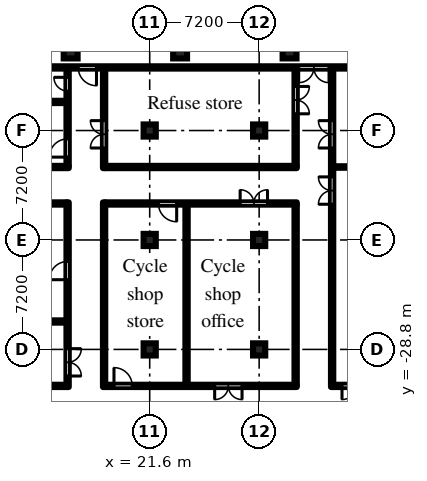
"""IFC4 building model, lengths in metres.
Left out: names, types, materials, properties, quantities, classifications, styles, units other than length and angle.
Written with IfcOpenShell. Run it as: python <this file> out.ifc"""

import sys

from ifc_helpers import new_model, si_unit, direction, frame, frame_2d, origin, origin_2d, place, context, subcontext, project, spatial, rectangle, hollow_circle, extrude, element, fill, save


model = new_model("IFC4")
c1 = context("Model", 3, precision=1e-05, world=origin(), true_north=direction((0.0, 1.0)))
c2 = subcontext(c1, "Body", "Model", "MODEL_VIEW")
j1 = project(units=[si_unit("LENGTHUNIT", "METRE"), si_unit("PLANEANGLEUNIT", "RADIAN")], contexts=[c1])
p1 = place(None, origin())
s1 = spatial("IfcSite", under=j1, at=p1, CompositionType="ELEMENT")
p2 = place(p1, origin())
s2 = spatial("IfcBuilding", under=s1, at=p2, CompositionType="ELEMENT")
p3 = place(p2, origin())
s3 = spatial("IfcBuildingStorey", under=s2, at=p3, CompositionType="ELEMENT", Elevation=0.0)
for number, where, z_axis, x_axis in (
    (1, (21.6, -28.8, 0.0), (0.0, 0.0, 1.0), (1.0, 0.0, 0.0)),
    (2, (21.6, -21.6, 0.0), (0.0, 0.0, 1.0), (1.0, 0.0, 0.0)),
    (3, (21.6, -14.4, 0.0), (0.0, 0.0, 1.0), (1.0, 0.0, 0.0)),
    (4, (28.8, -28.8, 0.0), (0.0, 0.0, 1.0), (1.0, 0.0, 0.0)),
    (5, (28.8, -21.6, 0.0), (0.0, 0.0, 1.0), (1.0, 0.0, 0.0)),
    (6, (28.8, -14.4, 0.0), (0.0, 0.0, 1.0), (1.0, 0.0, 0.0)),
):
    element("IfcColumn", number, at=place(p3, frame(where, z_axis=z_axis, x_axis=x_axis)), inside=s3, PredefinedType="COLUMN", context=c2, shape_type="SweptSolid", body=[
        extrude(rectangle(XDim=0.8, YDim=0.8, at=origin_2d()), origin(), (0.0, 0.0, 1.0), 6.6),
    ])
for number, where, z_axis, x_axis in (
    (7, (16.4, -9.2, 0.0), (0.0, 0.0, 1.0), (1.0, 0.0, 0.0)),
    (8, (23.6, -9.2, 0.0), (0.0, 0.0, 1.0), (1.0, 0.0, 0.0)),
    (9, (30.8, -9.2, 0.0), (0.0, 0.0, 1.0), (1.0, 0.0, 0.0)),
):
    element("IfcColumn", number, at=place(p3, frame(where, z_axis=z_axis, x_axis=x_axis)), inside=s3, PredefinedType="COLUMN", context=c2, shape_type="SweptSolid", body=[
        extrude(hollow_circle(Radius=0.457, WallThickness=0.05, at=origin_2d()), origin(), (0.0, 0.0, 1.0), 7.5),
    ])
p4 = place(p3, frame((9.521, -31.2, 0.0), z_axis=(0.0, 0.0, 1.0), x_axis=(1.0, 0.0, 0.0)))
e10 = element("IfcWall", 10, at=p4, inside=s3, PredefinedType="PARTITIONING", context=c2, shape_type="SweptSolid", body=[
    extrude(rectangle(XDim=6.604, YDim=0.15, at=frame_2d((3.302, 0.0))), origin(), (0.0, 0.0, 1.0), 6.6),
])
p5 = place(p4, frame((0.178, 0.0, 0.0)))
e11 = element("IfcOpeningElement", 11, at=p5, cuts=e10, PredefinedType="OPENING", context=c2, shape_type="SweptSolid", body=[
    extrude(rectangle(XDim=1.8, YDim=2.1, at=frame_2d((0.9, 1.05))), frame((0.0, 0.085, 0.0), z_axis=(0.0, -1.0, 0.0), x_axis=(1.0, 0.0, 0.0)), (0.0, 0.0, 1.0), 0.17),
])
for number, where, z_axis, x_axis in (
    (12, (7.275, -26.964, 0.0), (0.0, 0.0, 1.0), (1.0, 0.0, 0.0)),
    (13, (7.275, -19.2, 0.0), (0.0, 0.0, 1.0), (1.0, 0.0, 0.0)),
):
    element("IfcWall", number, at=place(p3, frame(where, z_axis=z_axis, x_axis=x_axis)), inside=s3, PredefinedType="PARTITIONING", context=c2, shape_type="SweptSolid", body=[
        extrude(rectangle(XDim=8.85, YDim=0.15, at=frame_2d((4.425, 0.0))), origin(), (0.0, 0.0, 1.0), 6.6),
    ])
p6 = place(p3, frame((9.521, -16.8, 0.0), z_axis=(0.0, 0.0, 1.0), x_axis=(1.0, 0.0, 0.0)))
e14 = element("IfcWall", 14, at=p6, inside=s3, PredefinedType="PARTITIONING", context=c2, shape_type="SweptSolid", body=[
    extrude(rectangle(XDim=6.753, YDim=0.15, at=frame_2d((3.377, 0.0))), origin(), (0.0, 0.0, 1.0), 6.6),
])
p7 = place(p3, frame((7.275, -12.518, 0.0), z_axis=(0.0, 0.0, 1.0), x_axis=(1.0, 0.0, 0.0)))
e15 = element("IfcWall", 15, at=p7, inside=s3, PredefinedType="PARTITIONING", context=c2, shape_type="SweptSolid", body=[
    extrude(rectangle(XDim=8.85, YDim=0.15, at=frame_2d((4.425, 0.0))), origin(), (0.0, 0.0, 1.0), 6.6),
])
p8 = place(p3, frame((12.675, -10.25, 0.0), z_axis=(0.0, 0.0, 1.0), x_axis=(1.0, 0.0, 0.0)))
e16 = element("IfcWall", 16, at=p8, inside=s3, PredefinedType="PARTITIONING", context=c2, shape_type="SweptSolid", body=[
    extrude(rectangle(XDim=37.545, YDim=0.15, at=frame_2d((18.772, 0.0))), origin(), (0.0, 0.0, 1.0), 6.6),
])
p9 = place(p8, frame((4.225, 0.0, 0.0)))
e17 = element("IfcOpeningElement", 17, at=p9, cuts=e16, PredefinedType="OPENING", context=c2, shape_type="SweptSolid", body=[
    extrude(rectangle(XDim=1.2, YDim=2.1, at=frame_2d((0.6, 1.05))), frame((0.0, 0.085, 0.0), z_axis=(0.0, -1.0, 0.0), x_axis=(1.0, 0.0, 0.0)), (0.0, 0.0, 1.0), 0.17),
])
p10 = place(p8, frame((18.725, 0.0, 0.0)))
e18 = element("IfcOpeningElement", 18, at=p10, cuts=e16, PredefinedType="OPENING", context=c2, shape_type="SweptSolid", body=[
    extrude(rectangle(XDim=2.0, YDim=2.1, at=frame_2d((1.0, 1.05))), frame((0.0, 0.085, 0.0), z_axis=(0.0, -1.0, 0.0), x_axis=(1.0, 0.0, 0.0)), (0.0, 0.0, 1.0), 0.17),
])
p11 = place(p3, frame((16.2, -31.275, 0.0), z_axis=(0.0, 0.0, 1.0), x_axis=(0.0, 1.0, 0.0)))
e19 = element("IfcWall", 19, at=p11, inside=s3, PredefinedType="PARTITIONING", context=c2, shape_type="SweptSolid", body=[
    extrude(rectangle(XDim=12.15, YDim=0.15, at=frame_2d((6.075, 0.0))), origin(), (0.0, 0.0, 1.0), 6.6),
])
p12 = place(p11, frame((0.725, 0.0, 0.0)))
e20 = element("IfcOpeningElement", 20, at=p12, cuts=e19, PredefinedType="OPENING", context=c2, shape_type="SweptSolid", body=[
    extrude(rectangle(XDim=1.8, YDim=2.1, at=frame_2d((0.9, 1.05))), frame((0.0, 0.085, 0.0), z_axis=(0.0, -1.0, 0.0), x_axis=(1.0, 0.0, 0.0)), (0.0, 0.0, 1.0), 0.17),
])
p13 = place(p11, frame((7.061, 0.0, 0.0)))
e21 = element("IfcOpeningElement", 21, at=p13, cuts=e19, PredefinedType="OPENING", context=c2, shape_type="SweptSolid", body=[
    extrude(rectangle(XDim=1.2, YDim=2.1, at=frame_2d((0.6, 1.05))), frame((0.0, 0.085, 0.0), z_axis=(0.0, -1.0, 0.0), x_axis=(1.0, 0.0, 0.0)), (0.0, 0.0, 1.0), 0.17),
])
p14 = place(p3, frame((16.2, -16.725, 0.0), z_axis=(0.0, 0.0, 1.0), x_axis=(0.0, 1.0, 0.0)))
e22 = element("IfcWall", 22, at=p14, inside=s3, PredefinedType="PARTITIONING", context=c2, shape_type="SweptSolid", body=[
    extrude(rectangle(XDim=6.4, YDim=0.15, at=frame_2d((3.2, 0.0))), origin(), (0.0, 0.0, 1.0), 6.6),
])
p15 = place(p14, frame((0.575, 0.0, 0.0)))
e23 = element("IfcOpeningElement", 23, at=p15, cuts=e22, PredefinedType="OPENING", context=c2, shape_type="SweptSolid", body=[
    extrude(rectangle(XDim=1.2, YDim=2.1, at=frame_2d((0.6, 1.05))), frame((0.0, 0.085, 0.0), z_axis=(0.0, -1.0, 0.0), x_axis=(1.0, 0.0, 0.0)), (0.0, 0.0, 1.0), 0.17),
])
p16 = place(p14, frame((4.925, 0.0, 0.0)))
e24 = element("IfcOpeningElement", 24, at=p16, cuts=e22, PredefinedType="OPENING", context=c2, shape_type="SweptSolid", body=[
    extrude(rectangle(XDim=0.9, YDim=2.1, at=frame_2d((0.45, 1.05))), frame((0.0, 0.085, 0.0), z_axis=(0.0, -1.0, 0.0), x_axis=(1.0, 0.0, 0.0)), (0.0, 0.0, 1.0), 0.17),
])
p17 = place(p3, frame((18.6, -31.275, 0.0), z_axis=(0.0, 0.0, 1.0), x_axis=(0.0, 1.0, 0.0)))
e25 = element("IfcWall", 25, at=p17, inside=s3, PredefinedType="PARTITIONING", context=c2, shape_type="SweptSolid", body=[
    extrude(rectangle(XDim=12.15, YDim=0.15, at=frame_2d((6.075, 0.0))), origin(), (0.0, 0.0, 1.0), 6.6),
])
p18 = place(p3, frame((18.675, -31.2, 0.0), z_axis=(0.0, 0.0, 1.0), x_axis=(1.0, 0.0, 0.0)))
e26 = element("IfcWall", 26, at=p18, inside=s3, PredefinedType="PARTITIONING", context=c2, shape_type="SweptSolid", body=[
    extrude(rectangle(XDim=12.6, YDim=0.15, at=frame_2d((6.3, 0.0))), origin(), (0.0, 0.0, 1.0), 6.6),
])
p19 = place(p18, frame((0.575, 0.0, 0.0)))
e27 = element("IfcOpeningElement", 27, at=p19, cuts=e26, PredefinedType="OPENING", context=c2, shape_type="SweptSolid", body=[
    extrude(rectangle(XDim=1.2, YDim=2.1, at=frame_2d((0.6, 1.05))), frame((0.0, 0.085, 0.0), z_axis=(0.0, -1.0, 0.0), x_axis=(1.0, 0.0, 0.0)), (0.0, 0.0, 1.0), 0.17),
])
p20 = place(p18, frame((7.199, 0.0, 0.0)))
e28 = element("IfcOpeningElement", 28, at=p20, cuts=e26, PredefinedType="OPENING", context=c2, shape_type="SweptSolid", body=[
    extrude(rectangle(XDim=1.8, YDim=2.1, at=frame_2d((0.9, 1.05))), frame((0.0, 0.085, 0.0), z_axis=(0.0, -1.0, 0.0), x_axis=(1.0, 0.0, 0.0)), (0.0, 0.0, 1.0), 0.17),
])
p21 = place(p3, frame((18.675, -19.2, 0.0), z_axis=(0.0, 0.0, 1.0), x_axis=(1.0, 0.0, 0.0)))
e29 = element("IfcWall", 29, at=p21, inside=s3, PredefinedType="PARTITIONING", context=c2, shape_type="SweptSolid", body=[
    extrude(rectangle(XDim=12.6, YDim=0.15, at=frame_2d((6.3, 0.0))), origin(), (0.0, 0.0, 1.0), 6.6),
])
p22 = place(p21, frame((3.499, 0.0, 0.0)))
e30 = element("IfcOpeningElement", 30, at=p22, cuts=e29, PredefinedType="OPENING", context=c2, shape_type="SweptSolid", body=[
    extrude(rectangle(XDim=1.2, YDim=2.1, at=frame_2d((0.6, 1.05))), frame((0.0, 0.085, 0.0), z_axis=(0.0, -1.0, 0.0), x_axis=(1.0, 0.0, 0.0)), (0.0, 0.0, 1.0), 0.17),
])
p23 = place(p21, frame((8.875, 0.0, 0.0)))
e31 = element("IfcOpeningElement", 31, at=p23, cuts=e29, PredefinedType="OPENING", context=c2, shape_type="SweptSolid", body=[
    extrude(rectangle(XDim=1.8, YDim=2.1, at=frame_2d((0.9, 1.05))), frame((0.0, 0.085, 0.0), z_axis=(0.0, -1.0, 0.0), x_axis=(1.0, 0.0, 0.0)), (0.0, 0.0, 1.0), 0.17),
])
p24 = place(p3, frame((18.6, -16.875, 0.0), z_axis=(0.0, 0.0, 1.0), x_axis=(0.0, 1.0, 0.0)))
e32 = element("IfcWall", 32, at=p24, inside=s3, PredefinedType="PARTITIONING", context=c2, shape_type="SweptSolid", body=[
    extrude(rectangle(XDim=6.55, YDim=0.15, at=frame_2d((3.275, 0.0))), origin(), (0.0, 0.0, 1.0), 6.6),
])
p25 = place(p24, frame((1.325, 0.0, 0.0)))
e33 = element("IfcOpeningElement", 33, at=p25, cuts=e32, PredefinedType="OPENING", context=c2, shape_type="SweptSolid", body=[
    extrude(rectangle(XDim=1.8, YDim=2.1, at=frame_2d((0.9, 1.05))), frame((0.0, 0.085, 0.0), z_axis=(0.0, -1.0, 0.0), x_axis=(1.0, 0.0, 0.0)), (0.0, 0.0, 1.0), 0.17),
])
p26 = place(p3, frame((18.675, -16.8, 0.0), z_axis=(0.0, 0.0, 1.0), x_axis=(1.0, 0.0, 0.0)))
e34 = element("IfcWall", 34, at=p26, inside=s3, PredefinedType="PARTITIONING", context=c2, shape_type="SweptSolid", body=[
    extrude(rectangle(XDim=12.6, YDim=0.15, at=frame_2d((6.3, 0.0))), origin(), (0.0, 0.0, 1.0), 6.6),
])
for number, where, z_axis, x_axis in (
    (35, (24.024, -31.125, 0.0), (0.0, 0.0, 1.0), (0.0, 1.0, 0.0)),
    (36, (31.2, -31.125, 0.0), (0.0, 0.0, 1.0), (0.0, 1.0, 0.0)),
):
    element("IfcWall", number, at=place(p3, frame(where, z_axis=z_axis, x_axis=x_axis)), inside=s3, PredefinedType="PARTITIONING", context=c2, shape_type="SweptSolid", body=[
        extrude(rectangle(XDim=11.85, YDim=0.15, at=frame_2d((5.925, 0.0))), origin(), (0.0, 0.0, 1.0), 6.6),
    ])
p27 = place(p3, frame((31.2, -16.725, 0.0), z_axis=(0.0, 0.0, 1.0), x_axis=(0.0, 1.0, 0.0)))
e37 = element("IfcWall", 37, at=p27, inside=s3, PredefinedType="PARTITIONING", context=c2, shape_type="SweptSolid", body=[
    extrude(rectangle(XDim=6.4, YDim=0.15, at=frame_2d((3.2, 0.0))), origin(), (0.0, 0.0, 1.0), 6.6),
])
p28 = place(p27, frame((3.425, 0.0, 0.0)))
e38 = element("IfcOpeningElement", 38, at=p28, cuts=e37, PredefinedType="OPENING", context=c2, shape_type="SweptSolid", body=[
    extrude(rectangle(XDim=1.8, YDim=2.1, at=frame_2d((0.9, 1.05))), frame((0.0, 0.085, 0.0), z_axis=(0.0, -1.0, 0.0), x_axis=(1.0, 0.0, 0.0)), (0.0, 0.0, 1.0), 0.17),
])
p29 = place(p3, frame((33.6, -31.275, 0.0), z_axis=(0.0, 0.0, 1.0), x_axis=(0.0, 1.0, 0.0)))
e39 = element("IfcWall", 39, at=p29, inside=s3, PredefinedType="PARTITIONING", context=c2, shape_type="SweptSolid", body=[
    extrude(rectangle(XDim=20.95, YDim=0.15, at=frame_2d((10.475, 0.0))), origin(), (0.0, 0.0, 1.0), 6.6),
])
p30 = place(p29, frame((15.725, 0.0, 0.0)))
e40 = element("IfcOpeningElement", 40, at=p30, cuts=e39, PredefinedType="OPENING", context=c2, shape_type="SweptSolid", body=[
    extrude(rectangle(XDim=1.8, YDim=2.1, at=frame_2d((0.9, 1.05))), frame((0.0, 0.085, 0.0), z_axis=(0.0, -1.0, 0.0), x_axis=(1.0, 0.0, 0.0)), (0.0, 0.0, 1.0), 0.17),
])
p31 = place(p29, frame((12.025, 0.0, 0.0)))
e41 = element("IfcOpeningElement", 41, at=p31, cuts=e39, PredefinedType="OPENING", context=c2, shape_type="SweptSolid", body=[
    extrude(rectangle(XDim=1.8, YDim=2.1, at=frame_2d((0.9, 1.05))), frame((0.0, 0.085, 0.0), z_axis=(0.0, -1.0, 0.0), x_axis=(1.0, 0.0, 0.0)), (0.0, 0.0, 1.0), 0.17),
])
p32 = place(p3, frame((33.675, -31.2, 0.0), z_axis=(0.0, 0.0, 1.0), x_axis=(1.0, 0.0, 0.0)))
e42 = element("IfcWall", 42, at=p32, inside=s3, PredefinedType="PARTITIONING", context=c2, shape_type="SweptSolid", body=[
    extrude(rectangle(XDim=16.545, YDim=0.15, at=frame_2d((8.272, 0.0))), origin(), (0.0, 0.0, 1.0), 6.6),
])
p33 = place(p32, frame((0.575, 0.0, 0.0)))
e43 = element("IfcOpeningElement", 43, at=p33, cuts=e42, PredefinedType="OPENING", context=c2, shape_type="SweptSolid", body=[
    extrude(rectangle(XDim=1.8, YDim=2.1, at=frame_2d((0.9, 1.05))), frame((0.0, 0.085, 0.0), z_axis=(0.0, -1.0, 0.0), x_axis=(1.0, 0.0, 0.0)), (0.0, 0.0, 1.0), 0.17),
])
p34 = place(p32, frame((13.775, 0.0, 0.0)))
e44 = element("IfcOpeningElement", 44, at=p34, cuts=e42, PredefinedType="OPENING", context=c2, shape_type="SweptSolid", body=[
    extrude(rectangle(XDim=1.8, YDim=2.1, at=frame_2d((0.9, 1.05))), frame((0.0, 0.085, 0.0), z_axis=(0.0, -1.0, 0.0), x_axis=(1.0, 0.0, 0.0)), (0.0, 0.0, 1.0), 0.17),
])
p35 = place(p3, frame((33.675, -16.8, 0.0), z_axis=(0.0, 0.0, 1.0), x_axis=(1.0, 0.0, 0.0)))
e45 = element("IfcWall", 45, at=p35, inside=s3, PredefinedType="PARTITIONING", context=c2, shape_type="SweptSolid", body=[
    extrude(rectangle(XDim=16.545, YDim=0.1, at=frame_2d((8.272, 0.0))), origin(), (0.0, 0.0, 1.0), 6.6),
])
p36 = place(p9, frame((1.2, 0.0, 0.0), z_axis=(0.0, 0.0, 1.0), x_axis=(-1.0, 0.0, 0.0)))
e46 = element("IfcDoor", 46, at=p36, inside=s3, OperationType="SINGLE_SWING_LEFT", PredefinedType="DOOR", context=c2, shape_type="SweptSolid", body=[
    extrude(rectangle(XDim=1.2, YDim=2.1, at=frame_2d((0.6, 1.05))), frame((0.0, 0.025, 0.0), z_axis=(0.0, -1.0, 0.0), x_axis=(1.0, 0.0, 0.0)), (0.0, 0.0, 1.0), 0.05),
])
fill(e17, e46)
p37 = place(p10, frame((2.0, 0.0, 0.0), z_axis=(0.0, 0.0, 1.0), x_axis=(-1.0, 0.0, 0.0)))
e47 = element("IfcDoor", 47, at=p37, inside=s3, OperationType="DOUBLE_DOOR_DOUBLE_SWING", PredefinedType="DOOR", context=c2, shape_type="SweptSolid", body=[
    extrude(rectangle(XDim=2.0, YDim=2.1, at=frame_2d((1.0, 1.05))), frame((0.0, 0.025, 0.0), z_axis=(0.0, -1.0, 0.0), x_axis=(1.0, 0.0, 0.0)), (0.0, 0.0, 1.0), 0.05),
])
fill(e18, e47)
p38 = place(p15, origin())
e48 = element("IfcDoor", 48, at=p38, inside=s3, OperationType="SINGLE_SWING_LEFT", PredefinedType="DOOR", context=c2, shape_type="SweptSolid", body=[
    extrude(rectangle(XDim=1.2, YDim=2.1, at=frame_2d((0.6, 1.05))), frame((0.0, 0.025, 0.0), z_axis=(0.0, -1.0, 0.0), x_axis=(1.0, 0.0, 0.0)), (0.0, 0.0, 1.0), 0.05),
])
fill(e23, e48)
p39 = place(p16, origin())
e49 = element("IfcDoor", 49, at=p39, inside=s3, OperationType="SINGLE_SWING_RIGHT", PredefinedType="DOOR", context=c2, shape_type="SweptSolid", body=[
    extrude(rectangle(XDim=0.9, YDim=2.1, at=frame_2d((0.45, 1.05))), frame((0.0, 0.025, 0.0), z_axis=(0.0, -1.0, 0.0), x_axis=(1.0, 0.0, 0.0)), (0.0, 0.0, 1.0), 0.05),
])
fill(e24, e49)
p40 = place(p25, origin())
e50 = element("IfcDoor", 50, at=p40, inside=s3, OperationType="DOUBLE_DOOR_DOUBLE_SWING", PredefinedType="DOOR", context=c2, shape_type="SweptSolid", body=[
    extrude(rectangle(XDim=1.8, YDim=2.1, at=frame_2d((0.9, 1.05))), frame((0.0, 0.025, 0.0), z_axis=(0.0, -1.0, 0.0), x_axis=(1.0, 0.0, 0.0)), (0.0, 0.0, 1.0), 0.05),
])
fill(e33, e50)
p41 = place(p28, frame((1.8, 0.0, 0.0), z_axis=(0.0, 0.0, 1.0), x_axis=(-1.0, 0.0, 0.0)))
e51 = element("IfcDoor", 51, at=p41, inside=s3, OperationType="DOUBLE_DOOR_DOUBLE_SWING", PredefinedType="DOOR", context=c2, shape_type="SweptSolid", body=[
    extrude(rectangle(XDim=1.8, YDim=2.1, at=frame_2d((0.9, 1.05))), frame((0.0, 0.025, 0.0), z_axis=(0.0, -1.0, 0.0), x_axis=(1.0, 0.0, 0.0)), (0.0, 0.0, 1.0), 0.05),
])
fill(e38, e51)
p42 = place(p12, frame((1.8, 0.0, 0.0), z_axis=(0.0, 0.0, 1.0), x_axis=(-1.0, 0.0, 0.0)))
e52 = element("IfcDoor", 52, at=p42, inside=s3, OperationType="DOUBLE_DOOR_DOUBLE_SWING", PredefinedType="DOOR", context=c2, shape_type="SweptSolid", body=[
    extrude(rectangle(XDim=1.8, YDim=2.1, at=frame_2d((0.9, 1.05))), frame((0.0, 0.025, 0.0), z_axis=(0.0, -1.0, 0.0), x_axis=(1.0, 0.0, 0.0)), (0.0, 0.0, 1.0), 0.05),
])
fill(e20, e52)
p43 = place(p13, origin())
e53 = element("IfcDoor", 53, at=p43, inside=s3, OperationType="SINGLE_SWING_LEFT", PredefinedType="DOOR", context=c2, shape_type="SweptSolid", body=[
    extrude(rectangle(XDim=1.2, YDim=2.1, at=frame_2d((0.6, 1.05))), frame((0.0, 0.025, 0.0), z_axis=(0.0, -1.0, 0.0), x_axis=(1.0, 0.0, 0.0)), (0.0, 0.0, 1.0), 0.05),
])
fill(e21, e53)
p44 = place(p19, origin())
e54 = element("IfcDoor", 54, at=p44, inside=s3, OperationType="SINGLE_SWING_LEFT", PredefinedType="DOOR", context=c2, shape_type="SweptSolid", body=[
    extrude(rectangle(XDim=1.2, YDim=2.1, at=frame_2d((0.6, 1.05))), frame((0.0, 0.025, 0.0), z_axis=(0.0, -1.0, 0.0), x_axis=(1.0, 0.0, 0.0)), (0.0, 0.0, 1.0), 0.05),
])
fill(e27, e54)
p45 = place(p22, frame((1.2, 0.0, 0.0), z_axis=(0.0, 0.0, 1.0), x_axis=(-1.0, 0.0, 0.0)))
e55 = element("IfcDoor", 55, at=p45, inside=s3, OperationType="SINGLE_SWING_LEFT", PredefinedType="DOOR", context=c2, shape_type="SweptSolid", body=[
    extrude(rectangle(XDim=1.2, YDim=2.1, at=frame_2d((0.6, 1.05))), frame((0.0, 0.025, 0.0), z_axis=(0.0, -1.0, 0.0), x_axis=(1.0, 0.0, 0.0)), (0.0, 0.0, 1.0), 0.05),
])
fill(e30, e55)
p46 = place(p20, frame((1.8, 0.0, 0.0), z_axis=(0.0, 0.0, 1.0), x_axis=(-1.0, 0.0, 0.0)))
e56 = element("IfcDoor", 56, at=p46, inside=s3, OperationType="DOUBLE_DOOR_DOUBLE_SWING", PredefinedType="DOOR", context=c2, shape_type="SweptSolid", body=[
    extrude(rectangle(XDim=1.8, YDim=2.1, at=frame_2d((0.9, 1.05))), frame((0.0, 0.025, 0.0), z_axis=(0.0, -1.0, 0.0), x_axis=(1.0, 0.0, 0.0)), (0.0, 0.0, 1.0), 0.05),
])
fill(e28, e56)
p47 = place(p23, origin())
e57 = element("IfcDoor", 57, at=p47, inside=s3, OperationType="DOUBLE_DOOR_DOUBLE_SWING", PredefinedType="DOOR", context=c2, shape_type="SweptSolid", body=[
    extrude(rectangle(XDim=1.8, YDim=2.1, at=frame_2d((0.9, 1.05))), frame((0.0, 0.025, 0.0), z_axis=(0.0, -1.0, 0.0), x_axis=(1.0, 0.0, 0.0)), (0.0, 0.0, 1.0), 0.05),
])
fill(e31, e57)
p48 = place(p30, origin())
e58 = element("IfcDoor", 58, at=p48, inside=s3, OperationType="DOUBLE_DOOR_DOUBLE_SWING", PredefinedType="DOOR", context=c2, shape_type="SweptSolid", body=[
    extrude(rectangle(XDim=1.8, YDim=2.1, at=frame_2d((0.9, 1.05))), frame((0.0, 0.025, 0.0), z_axis=(0.0, -1.0, 0.0), x_axis=(1.0, 0.0, 0.0)), (0.0, 0.0, 1.0), 0.05),
])
fill(e40, e58)
p49 = place(p31, origin())
e59 = element("IfcDoor", 59, at=p49, inside=s3, OperationType="DOUBLE_DOOR_DOUBLE_SWING", PredefinedType="DOOR", context=c2, shape_type="SweptSolid", body=[
    extrude(rectangle(XDim=1.8, YDim=2.1, at=frame_2d((0.9, 1.05))), frame((0.0, 0.025, 0.0), z_axis=(0.0, -1.0, 0.0), x_axis=(1.0, 0.0, 0.0)), (0.0, 0.0, 1.0), 0.05),
])
fill(e41, e59)
p50 = place(p33, frame((1.8, 0.0, 0.0), z_axis=(0.0, 0.0, 1.0), x_axis=(-1.0, 0.0, 0.0)))
e60 = element("IfcDoor", 60, at=p50, inside=s3, OperationType="DOUBLE_DOOR_DOUBLE_SWING", PredefinedType="DOOR", context=c2, shape_type="SweptSolid", body=[
    extrude(rectangle(XDim=1.8, YDim=2.1, at=frame_2d((0.9, 1.05))), frame((0.0, 0.025, 0.0), z_axis=(0.0, -1.0, 0.0), x_axis=(1.0, 0.0, 0.0)), (0.0, 0.0, 1.0), 0.05),
])
fill(e43, e60)
save(model, sys.argv[1])
